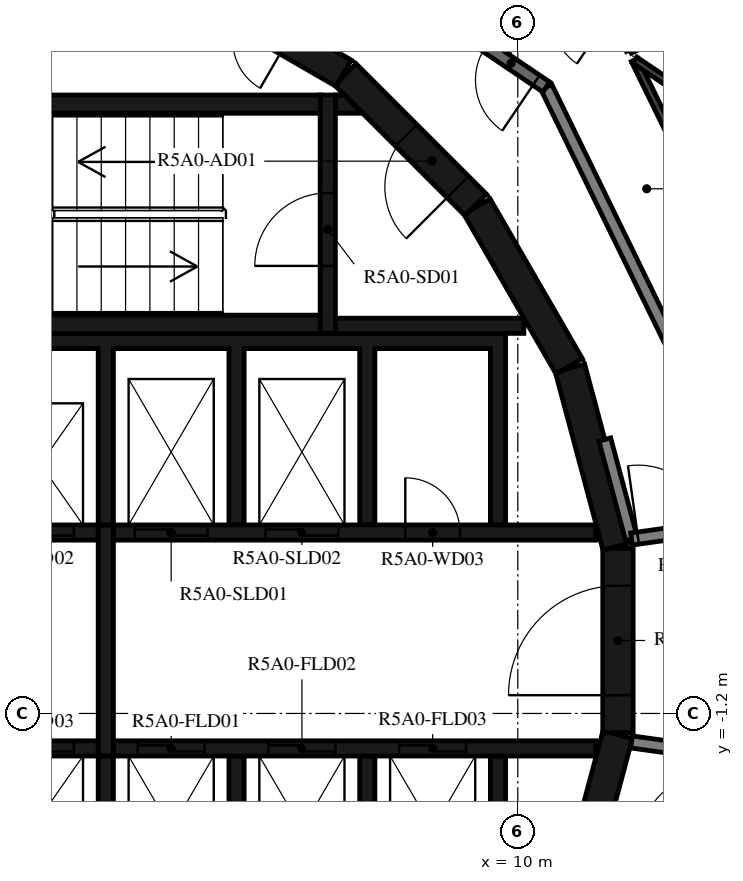
"""IFC4 building model, lengths in metres.
Left out: names, types, materials, properties, quantities, classifications, styles, units other than length and angle.
Written with IfcOpenShell. Run it as: python <this file> out.ifc"""

import sys

from ifc_helpers import new_model, si_unit, direction, frame, frame_2d, origin, place, context, subcontext, project, spatial, polyline, rectangle, outline, extrude, element, fill, save


model = new_model("IFC4")
c1 = context("Model", 3, precision=1e-05, world=origin(), true_north=direction((0.0, 1.0)))
c2 = subcontext(c1, "Body", "Model", "MODEL_VIEW")
j1 = project(units=[si_unit("LENGTHUNIT", "METRE"), si_unit("PLANEANGLEUNIT", "RADIAN")], contexts=[c1])
p1 = place(None, origin())
s1 = spatial("IfcSite", under=j1, at=p1, CompositionType="ELEMENT")
p2 = place(p1, origin())
s2 = spatial("IfcBuilding", under=s1, at=p2, CompositionType="ELEMENT")
p3 = place(p2, frame((0.0, 0.0, 195.4)))
s3 = spatial("IfcBuildingStorey", under=s2, at=p3, CompositionType="ELEMENT", Elevation=195.4)
p4 = place(p3, frame((10.858, -4.479, 0.0), z_axis=(0.0, 0.0, 1.0), x_axis=(0.258734743916, 0.965948410781, 0.0)))
e1 = element("IfcWall", 1, at=p4, inside=s3, PredefinedType="SHEAR", context=c2, shape_type="SweptSolid", body=[
    extrude(rectangle(XDim=3.033, YDim=0.5, at=frame_2d((1.516, 0.0))), origin(), (0.0, 0.0, 1.0), 3.12),
])
p5 = place(p3, frame((11.647, -1.516, 0.0), z_axis=(0.0, 0.0, 1.0), x_axis=(0.0, 1.0, 0.0)))
e2 = element("IfcWall", 2, at=p5, inside=s3, PredefinedType="SHEAR", context=c2, shape_type="SweptSolid", body=[
    extrude(rectangle(XDim=3.033, YDim=0.5, at=frame_2d((1.516, 0.0))), origin(), (0.0, 0.0, 1.0), 3.12),
])
p6 = place(p5, frame((0.616, 0.0, 0.0)))
e3 = element("IfcOpeningElement", 3, at=p6, cuts=e2, PredefinedType="OPENING", context=c2, shape_type="SweptSolid", body=[
    extrude(rectangle(XDim=1.8, YDim=2.1, at=frame_2d((0.9, 1.05))), frame((0.0, 0.26, 0.0), z_axis=(0.0, -1.0, 0.0), x_axis=(1.0, 0.0, 0.0)), (0.0, 0.0, 1.0), 0.52),
])
for number, where, z_axis, x_axis in (
    (4, (11.643, 1.55, 0.0), (0.0, 0.0, 1.0), (-0.259, 0.966, 0.0)),
    (5, (10.845, 4.51, 0.0), (0.0, 0.0, 1.0), (-0.5, 0.866, 0.0)),
):
    element("IfcWall", number, at=place(p3, frame(where, z_axis=z_axis, x_axis=x_axis)), inside=s3, PredefinedType="SHEAR", context=c2, shape_type="SweptSolid", body=[
        extrude(rectangle(XDim=3.033, YDim=0.5, at=frame_2d((1.516, 0.0))), origin(), (0.0, 0.0, 1.0), 3.12),
    ])
p7 = place(p3, frame((9.308, 7.164, 0.0), z_axis=(0.0, 0.0, 1.0), x_axis=(-0.707106781187, 0.707106781187, 0.0)))
e6 = element("IfcWall", 6, at=p7, inside=s3, PredefinedType="SHEAR", context=c2, shape_type="SweptSolid", body=[
    extrude(rectangle(XDim=3.032, YDim=0.5, at=frame_2d((1.516, 0.0))), origin(), (0.0, 0.0, 1.0), 3.12),
])
p8 = place(p7, frame((0.416, 0.0, 0.0)))
e7 = element("IfcOpeningElement", 7, at=p8, cuts=e6, PredefinedType="OPENING", context=c2, shape_type="SweptSolid", body=[
    extrude(rectangle(XDim=1.2, YDim=2.1, at=frame_2d((0.6, 1.05))), frame((0.0, 0.26, 0.0), z_axis=(0.0, -1.0, 0.0), x_axis=(1.0, 0.0, 0.0)), (0.0, 0.0, 1.0), 0.52),
])
p9 = place(p3, frame((7.137, 9.329, 0.0), z_axis=(0.0, 0.0, 1.0), x_axis=(-0.865975092491, 0.500087131594, 0.0)))
e8 = element("IfcWall", 8, at=p9, inside=s3, PredefinedType="SHEAR", context=c2, shape_type="SweptSolid", body=[
    extrude(rectangle(XDim=3.033, YDim=0.5, at=frame_2d((1.516, 0.0))), origin(), (0.0, 0.0, 1.0), 3.12),
])
p10 = place(p9, frame((1.066, 0.0, 0.0)))
e9 = element("IfcOpeningElement", 9, at=p10, cuts=e8, PredefinedType="OPENING", context=c2, shape_type="SweptSolid", body=[
    extrude(rectangle(XDim=0.9, YDim=2.1, at=frame_2d((0.45, 1.05))), frame((0.0, 0.26, 0.0), z_axis=(0.0, -1.0, 0.0), x_axis=(1.0, 0.0, 0.0)), (0.0, 0.0, 1.0), 0.52),
])
for number, where, z_axis, x_axis in (
    (10, (0.0, 5.2, 0.0), (0.0, 0.0, 1.0), (1.0, 0.0, 0.0)),
    (11, (0.0, 8.82, 0.0), (0.0, 0.0, 1.0), (1.0, 0.0, 0.0)),
):
    element("IfcWall", number, at=place(p3, frame(where, z_axis=z_axis, x_axis=x_axis)), inside=s3, PredefinedType="SHEAR", context=c2, shape_type="SweptSolid", body=[
        extrude(rectangle(XDim=6.75, YDim=0.3, at=frame_2d((3.375, 0.0))), origin(), (0.0, 0.0, 1.0), 3.12),
    ])
p11 = place(p3, frame((6.875, 5.05, 0.0), z_axis=(0.0, 0.0, 1.0), x_axis=(0.0, 1.0, 0.0)))
e12 = element("IfcWall", 12, at=p11, inside=s3, PredefinedType="SHEAR", context=c2, shape_type="SweptSolid", body=[
    extrude(rectangle(XDim=3.92, YDim=0.25, at=frame_2d((1.96, 0.0))), origin(), (0.0, 0.0, 1.0), 3.12),
])
p12 = place(p11, frame((1.11, 0.0, 0.0)))
e13 = element("IfcOpeningElement", 13, at=p12, cuts=e12, PredefinedType="OPENING", context=c2, shape_type="SweptSolid", body=[
    extrude(rectangle(XDim=1.2, YDim=2.1, at=frame_2d((0.6, 1.05))), frame((0.0, 0.135, 0.0), z_axis=(0.0, -1.0, 0.0), x_axis=(1.0, 0.0, 0.0)), (0.0, 0.0, 1.0), 0.27),
])
p13 = place(p3, frame((7.0, 5.175, 0.0), z_axis=(0.0, 0.0, 1.0), x_axis=(1.0, 0.0, 0.0)))
e14 = element("IfcWall", 14, at=p13, inside=s3, PredefinedType="SHEAR", context=c2, shape_type="SweptSolid", body=[
    extrude(rectangle(XDim=3.1, YDim=0.25, at=frame_2d((1.55, 0.0))), origin(), (0.0, 0.0, 1.0), 3.12),
])
p14 = place(p3, origin())
e15 = element("IfcWall", 15, at=p14, inside=s3, PredefinedType="SHEAR", context=c2, shape_type="SweptSolid", body=[
    extrude(outline(polyline([(7.448, 8.67), (7.0, 8.67), (7.0, 8.97), (7.148, 8.97), (7.448, 8.67)])), origin(), (0.0, 0.0, 1.0), 3.12),
])
p15 = place(p3, origin())
e16 = element("IfcWall", 16, at=p15, inside=s3, PredefinedType="SHEAR", context=c2, shape_type="SweptSolid", body=[
    extrude(outline(polyline([(-9.55, 4.8), (-5.5, 4.8), (-5.5, 1.9), (-5.25, 1.9), (-5.25, 4.8), (-1.2, 4.8), (-1.2, 1.9), (-0.95, 1.9), (-0.95, 4.8), (0.95, 4.8), (0.95, 1.9), (1.2, 1.9), (1.2, 4.8), (3.1, 4.8), (3.1, 1.9), (3.35, 1.9), (3.35, 4.8), (5.25, 4.8), (5.25, 1.9), (5.5, 1.9), (5.5, 4.8), (7.4, 4.8), (7.4, 1.9), (7.65, 1.9), (7.65, 4.8), (9.55, 4.8), (9.55, 1.9), (9.8, 1.9), (9.8, 4.8), (9.8, 5.05), (-9.8, 5.05), (-9.8, 4.8), (-9.8, 1.9), (-9.55, 1.9), (-9.55, 4.8)])), origin(), (0.0, 0.0, 1.0), 3.12),
])
p16 = place(p3, origin())
e17 = element("IfcWall", 17, at=p16, inside=s3, PredefinedType="SHEAR", context=c2, shape_type="SweptSolid", body=[
    extrude(outline(polyline([(9.8, -5.05), (9.8, -4.8), (9.8, -1.9), (9.55, -1.9), (9.55, -4.8), (7.65, -4.8), (7.65, -1.9), (7.4, -1.9), (7.4, -4.8), (5.5, -4.8), (5.5, -1.9), (5.25, -1.9), (5.25, -4.8), (3.35, -4.8), (3.35, -1.9), (3.1, -1.9), (3.1, -4.8), (1.2, -4.8), (1.2, -1.9), (0.95, -1.9), (0.95, -4.8), (-0.95, -4.8), (-0.95, -1.9), (-1.2, -1.9), (-1.2, -4.8), (-3.1, -4.8), (-3.1, -1.9), (-3.35, -1.9), (-3.35, -4.8), (-5.25, -4.8), (-5.25, -1.9), (-5.5, -1.9), (-5.5, -4.8), (-7.4, -4.8), (-7.4, -1.9), (-7.65, -1.9), (-7.65, -4.8), (-9.55, -4.8), (-9.55, -1.9), (-9.8, -1.9), (-9.8, -4.8), (-9.8, -5.05), (9.8, -5.05)])), origin(), (0.0, 0.0, 1.0), 3.12),
])
p17 = place(p3, frame((-11.28, 1.775, 0.0), z_axis=(0.0, 0.0, 1.0), x_axis=(1.0, 0.0, 0.0)))
e18 = element("IfcWall", 18, at=p17, inside=s3, PredefinedType="SHEAR", context=c2, shape_type="SweptSolid", body=[
    extrude(rectangle(XDim=14.38, YDim=0.25, at=frame_2d((7.19, 0.0))), origin(), (0.0, 0.0, 1.0), 3.12),
])
p18 = place(p17, frame((10.73, 0.0, 0.0)))
e19 = element("IfcOpeningElement", 19, at=p18, cuts=e18, PredefinedType="OPENING", context=c2, shape_type="SweptSolid", body=[
    extrude(rectangle(XDim=1.1, YDim=2.1, at=frame_2d((0.55, 1.05))), frame((0.0, 0.135, 0.0), z_axis=(0.0, -1.0, 0.0), x_axis=(1.0, 0.0, 0.0)), (0.0, 0.0, 1.0), 0.27),
])
p19 = place(p17, frame((12.88, 0.0, 0.0)))
e20 = element("IfcOpeningElement", 20, at=p19, cuts=e18, PredefinedType="OPENING", context=c2, shape_type="SweptSolid", body=[
    extrude(rectangle(XDim=1.1, YDim=2.1, at=frame_2d((0.55, 1.05))), frame((0.0, 0.135, 0.0), z_axis=(0.0, -1.0, 0.0), x_axis=(1.0, 0.0, 0.0)), (0.0, 0.0, 1.0), 0.27),
])
p20 = place(p17, frame((3.305, 0.0, 0.0)))
e21 = element("IfcOpeningElement", 21, at=p20, cuts=e18, PredefinedType="OPENING", context=c2, shape_type="SweptSolid", body=[
    extrude(rectangle(XDim=0.9, YDim=2.1, at=frame_2d((0.45, 1.05))), frame((0.0, 0.135, 0.0), z_axis=(0.0, -1.0, 0.0), x_axis=(1.0, 0.0, 0.0)), (0.0, 0.0, 1.0), 0.27),
])
p21 = place(p17, frame((7.605, 0.0, 0.0)))
e22 = element("IfcOpeningElement", 22, at=p21, cuts=e18, PredefinedType="OPENING", context=c2, shape_type="SweptSolid", body=[
    extrude(rectangle(XDim=0.9, YDim=2.1, at=frame_2d((0.45, 1.05))), frame((0.0, 0.135, 0.0), z_axis=(0.0, -1.0, 0.0), x_axis=(1.0, 0.0, 0.0)), (0.0, 0.0, 1.0), 0.27),
])
p22 = place(p3, frame((3.35, 1.775, 0.0), z_axis=(0.0, 0.0, 1.0), x_axis=(1.0, 0.0, 0.0)))
e23 = element("IfcWall", 23, at=p22, inside=s3, PredefinedType="SHEAR", context=c2, shape_type="SweptSolid", body=[
    extrude(rectangle(XDim=7.93, YDim=0.25, at=frame_2d((3.965, 0.0))), origin(), (0.0, 0.0, 1.0), 3.12),
])
p23 = place(p22, frame((0.35, 0.0, 0.0)))
e24 = element("IfcOpeningElement", 24, at=p23, cuts=e23, PredefinedType="OPENING", context=c2, shape_type="SweptSolid", body=[
    extrude(rectangle(XDim=1.2, YDim=2.4, at=frame_2d((0.6, 1.2))), frame((0.0, 0.135, 0.0), z_axis=(0.0, -1.0, 0.0), x_axis=(1.0, 0.0, 0.0)), (0.0, 0.0, 1.0), 0.27),
])
p24 = place(p22, frame((2.5, 0.0, 0.0)))
e25 = element("IfcOpeningElement", 25, at=p24, cuts=e23, PredefinedType="OPENING", context=c2, shape_type="SweptSolid", body=[
    extrude(rectangle(XDim=1.2, YDim=2.4, at=frame_2d((0.6, 1.2))), frame((0.0, 0.135, 0.0), z_axis=(0.0, -1.0, 0.0), x_axis=(1.0, 0.0, 0.0)), (0.0, 0.0, 1.0), 0.27),
])
p25 = place(p22, frame((4.8, 0.0, 0.0)))
e26 = element("IfcOpeningElement", 26, at=p25, cuts=e23, PredefinedType="OPENING", context=c2, shape_type="SweptSolid", body=[
    extrude(rectangle(XDim=0.9, YDim=2.1, at=frame_2d((0.45, 1.05))), frame((0.0, 0.135, 0.0), z_axis=(0.0, -1.0, 0.0), x_axis=(1.0, 0.0, 0.0)), (0.0, 0.0, 1.0), 0.27),
])
p26 = place(p3, frame((-11.28, -1.775, 0.0), z_axis=(0.0, 0.0, 1.0), x_axis=(1.0, 0.0, 0.0)))
e27 = element("IfcWall", 27, at=p26, inside=s3, PredefinedType="SHEAR", context=c2, shape_type="SweptSolid", body=[
    extrude(rectangle(XDim=14.38, YDim=0.25, at=frame_2d((7.19, 0.0))), origin(), (0.0, 0.0, 1.0), 3.12),
])
p27 = place(p26, frame((12.88, 0.0, 0.0)))
e28 = element("IfcOpeningElement", 28, at=p27, cuts=e27, PredefinedType="OPENING", context=c2, shape_type="SweptSolid", body=[
    extrude(rectangle(XDim=1.1, YDim=2.1, at=frame_2d((0.55, 1.05))), frame((0.0, 0.135, 0.0), z_axis=(0.0, -1.0, 0.0), x_axis=(1.0, 0.0, 0.0)), (0.0, 0.0, 1.0), 0.27),
])
p28 = place(p26, frame((6.53, 0.0, 0.0)))
e29 = element("IfcOpeningElement", 29, at=p28, cuts=e27, PredefinedType="OPENING", context=c2, shape_type="SweptSolid", body=[
    extrude(rectangle(XDim=0.9, YDim=2.1, at=frame_2d((0.45, 1.05))), frame((0.0, 0.135, 0.0), z_axis=(0.0, -1.0, 0.0), x_axis=(1.0, 0.0, 0.0)), (0.0, 0.0, 1.0), 0.27),
])
p29 = place(p26, frame((8.68, 0.0, 0.0)))
e30 = element("IfcOpeningElement", 30, at=p29, cuts=e27, PredefinedType="OPENING", context=c2, shape_type="SweptSolid", body=[
    extrude(rectangle(XDim=0.9, YDim=2.1, at=frame_2d((0.45, 1.05))), frame((0.0, 0.135, 0.0), z_axis=(0.0, -1.0, 0.0), x_axis=(1.0, 0.0, 0.0)), (0.0, 0.0, 1.0), 0.27),
])
p30 = place(p26, frame((10.83, 0.0, 0.0)))
e31 = element("IfcOpeningElement", 31, at=p30, cuts=e27, PredefinedType="OPENING", context=c2, shape_type="SweptSolid", body=[
    extrude(rectangle(XDim=0.9, YDim=2.1, at=frame_2d((0.45, 1.05))), frame((0.0, 0.135, 0.0), z_axis=(0.0, -1.0, 0.0), x_axis=(1.0, 0.0, 0.0)), (0.0, 0.0, 1.0), 0.27),
])
p31 = place(p3, frame((3.35, -1.775, 0.0), z_axis=(0.0, 0.0, 1.0), x_axis=(1.0, 0.0, 0.0)))
e32 = element("IfcWall", 32, at=p31, inside=s3, PredefinedType="SHEAR", context=c2, shape_type="SweptSolid", body=[
    extrude(rectangle(XDim=7.93, YDim=0.25, at=frame_2d((3.965, 0.0))), origin(), (0.0, 0.0, 1.0), 3.12),
])
p32 = place(p31, frame((0.4, 0.0, 0.0)))
e33 = element("IfcOpeningElement", 33, at=p32, cuts=e32, PredefinedType="OPENING", context=c2, shape_type="SweptSolid", body=[
    extrude(rectangle(XDim=1.1, YDim=2.4, at=frame_2d((0.55, 1.2))), frame((0.0, 0.135, 0.0), z_axis=(0.0, -1.0, 0.0), x_axis=(1.0, 0.0, 0.0)), (0.0, 0.0, 1.0), 0.27),
])
p33 = place(p31, frame((2.55, 0.0, 0.0)))
e34 = element("IfcOpeningElement", 34, at=p33, cuts=e32, PredefinedType="OPENING", context=c2, shape_type="SweptSolid", body=[
    extrude(rectangle(XDim=1.1, YDim=2.4, at=frame_2d((0.55, 1.2))), frame((0.0, 0.135, 0.0), z_axis=(0.0, -1.0, 0.0), x_axis=(1.0, 0.0, 0.0)), (0.0, 0.0, 1.0), 0.27),
])
p34 = place(p31, frame((4.7, 0.0, 0.0)))
e35 = element("IfcOpeningElement", 35, at=p34, cuts=e32, PredefinedType="OPENING", context=c2, shape_type="SweptSolid", body=[
    extrude(rectangle(XDim=1.1, YDim=2.4, at=frame_2d((0.55, 1.2))), frame((0.0, 0.135, 0.0), z_axis=(0.0, -1.0, 0.0), x_axis=(1.0, 0.0, 0.0)), (0.0, 0.0, 1.0), 0.27),
])
p35 = place(p3, frame((3.225, -1.9, 0.0), z_axis=(0.0, 0.0, 1.0), x_axis=(0.0, 1.0, 0.0)))
e36 = element("IfcWall", 36, at=p35, inside=s3, PredefinedType="SHEAR", context=c2, shape_type="SweptSolid", body=[
    extrude(rectangle(XDim=3.8, YDim=0.25, at=frame_2d((1.9, 0.0))), origin(), (0.0, 0.0, 1.0), 3.12),
])
p36 = place(p3, frame((11.87, 1.668, 0.0), z_axis=(0.0, 0.0, 1.0), x_axis=(-0.258836880648, 0.965921047093, 0.0)))
e37 = element("IfcWall", 37, at=p36, inside=s3, PredefinedType="STANDARD", context=c2, shape_type="SweptSolid", body=[
    extrude(rectangle(XDim=1.695, YDim=0.2, at=frame_2d((0.848, 0.0))), origin(), (0.0, 0.0, 1.0), 3.12),
])
p37 = place(p3, frame((11.87, 1.668, 0.0), z_axis=(0.0, 0.0, 1.0), x_axis=(0.990271931984, 0.139145609792, 0.0)))
e38 = element("IfcWall", 38, at=p37, inside=s3, PredefinedType="STANDARD", context=c2, shape_type="SweptSolid", body=[
    extrude(rectangle(XDim=1.712, YDim=0.2, at=frame_2d((0.856, 0.0))), origin(), (0.0, 0.0, 1.0), 3.12),
])
p38 = place(p37, frame((0.11, 0.0, 0.0)))
e39 = element("IfcOpeningElement", 39, at=p38, cuts=e38, PredefinedType="OPENING", context=c2, shape_type="SweptSolid", body=[
    extrude(rectangle(XDim=1.2, YDim=2.1, at=frame_2d((0.6, 1.05))), frame((0.0, 0.11, 0.0), z_axis=(0.0, -1.0, 0.0), x_axis=(1.0, 0.0, 0.0)), (0.0, 0.0, 1.0), 0.22),
])
p39 = place(p3, frame((13.618, 2.647, 0.0), z_axis=(0.0, 0.0, 1.0), x_axis=(-0.438366026218, 0.898796543751, 0.0)))
e40 = element("IfcWall", 40, at=p39, inside=s3, PredefinedType="STANDARD", context=c2, shape_type="SweptSolid", body=[
    extrude(rectangle(XDim=7.181, YDim=0.2, at=frame_2d((3.591, 0.0))), origin(), (0.0, 0.0, 1.0), 3.12),
])
p40 = place(p3, frame((10.47, 9.101, 0.0), z_axis=(0.0, 0.0, 1.0), x_axis=(-0.829035841718, 0.559195469534, 0.0)))
e41 = element("IfcWall", 41, at=p40, inside=s3, PredefinedType="STANDARD", context=c2, shape_type="SweptSolid", body=[
    extrude(rectangle(XDim=7.181, YDim=0.2, at=frame_2d((3.591, 0.0))), origin(), (0.0, 0.0, 1.0), 3.12),
])
p41 = place(p40, frame((0.2, 0.0, 0.0)))
e42 = element("IfcOpeningElement", 42, at=p41, cuts=e41, PredefinedType="OPENING", context=c2, shape_type="SweptSolid", body=[
    extrude(rectangle(XDim=1.0, YDim=2.1, at=frame_2d((0.5, 1.05))), frame((0.0, 0.11, 0.0), z_axis=(0.0, -1.0, 0.0), x_axis=(1.0, 0.0, 0.0)), (0.0, 0.0, 1.0), 0.22),
])
p42 = place(p40, frame((5.073, 0.0, 0.0)))
e43 = element("IfcOpeningElement", 43, at=p42, cuts=e41, PredefinedType="OPENING", context=c2, shape_type="SweptSolid", body=[
    extrude(rectangle(XDim=1.0, YDim=2.1, at=frame_2d((0.5, 1.05))), frame((0.0, 0.11, 0.0), z_axis=(0.0, -1.0, 0.0), x_axis=(1.0, 0.0, 0.0)), (0.0, 0.0, 1.0), 0.22),
])
p43 = place(p3, frame((13.302, -1.869, 0.0), z_axis=(0.0, 0.0, 1.0), x_axis=(-0.990274397042, 0.13912806533, 0.0)))
e44 = element("IfcWall", 44, at=p43, inside=s3, PredefinedType="STANDARD", context=c2, shape_type="SweptSolid", body=[
    extrude(rectangle(XDim=1.446, YDim=0.2, at=frame_2d((0.723, 0.0))), origin(), (0.0, 0.0, 1.0), 3.12),
])
p44 = place(p3, frame((13.953, 5.382, 0.0), z_axis=(0.0, 0.0, 1.0), x_axis=(-0.438382107355, 0.898788700391, 0.0)))
e45 = element("IfcWall", 45, at=p44, inside=s3, PredefinedType="PARTITIONING", context=c2, shape_type="SweptSolid", body=[
    extrude(rectangle(XDim=4.634, YDim=0.12, at=frame_2d((2.317, 0.0))), origin(), (0.0, 0.0, 1.0), 3.12),
])
p45 = place(p3, frame((22.598, 2.345, 0.0), z_axis=(0.0, 0.0, 1.0), x_axis=(-0.829034113947, 0.559198031034, 0.0)))
e46 = element("IfcWall", 46, at=p45, inside=s3, PredefinedType="PARTITIONING", context=c2, shape_type="SweptSolid", body=[
    extrude(rectangle(XDim=12.879, YDim=0.12, at=frame_2d((6.439, 0.0))), origin(), (0.0, 0.0, 1.0), 3.12),
])
p46 = place(p45, frame((0.2, 0.0, 0.0)))
e47 = element("IfcOpeningElement", 47, at=p46, cuts=e46, PredefinedType="OPENING", context=c2, shape_type="SweptSolid", body=[
    extrude(rectangle(XDim=0.9, YDim=2.1, at=frame_2d((0.45, 1.05))), frame((0.0, 0.07, 0.0), z_axis=(0.0, -1.0, 0.0), x_axis=(1.0, 0.0, 0.0)), (0.0, 0.0, 1.0), 0.14),
])
p47 = place(p3, frame((15.482, 11.487, 0.0), z_axis=(0.0, 0.0, 1.0), x_axis=(-0.898807251285, -0.438344071521, 0.0)))
e48 = element("IfcWall", 48, at=p47, inside=s3, PredefinedType="PARTITIONING", context=c2, shape_type="SweptSolid", body=[
    extrude(rectangle(XDim=4.051, YDim=0.12, at=frame_2d((2.025, 0.0))), origin(), (0.0, 0.0, 1.0), 3.12),
])
p48 = place(p12, origin())
e49 = element("IfcDoor", 49, at=p48, inside=s3, OperationType="SINGLE_SWING_LEFT", PredefinedType="DOOR", context=c2, shape_type="SweptSolid", body=[
    extrude(rectangle(XDim=1.2, YDim=2.1, at=frame_2d((0.6, 1.05))), frame((0.0, 0.025, 0.0), z_axis=(0.0, -1.0, 0.0), x_axis=(1.0, 0.0, 0.0)), (0.0, 0.0, 1.0), 0.05),
])
fill(e13, e49)
p49 = place(p8, origin())
e50 = element("IfcDoor", 50, at=p49, inside=s3, OperationType="SINGLE_SWING_RIGHT", PredefinedType="DOOR", context=c2, shape_type="SweptSolid", body=[
    extrude(rectangle(XDim=1.2, YDim=2.1, at=frame_2d((0.6, 1.05))), frame((0.0, 0.025, 0.0), z_axis=(0.0, -1.0, 0.0), x_axis=(1.0, 0.0, 0.0)), (0.0, 0.0, 1.0), 0.05),
])
fill(e7, e50)
p50 = place(p6, origin())
e51 = element("IfcDoor", 51, at=p50, inside=s3, OperationType="DOUBLE_DOOR_SINGLE_SWING", PredefinedType="DOOR", context=c2, shape_type="SweptSolid", body=[
    extrude(rectangle(XDim=1.8, YDim=2.1, at=frame_2d((0.9, 1.05))), frame((0.0, 0.025, 0.0), z_axis=(0.0, -1.0, 0.0), x_axis=(1.0, 0.0, 0.0)), (0.0, 0.0, 1.0), 0.05),
])
fill(e3, e51)
p51 = place(p19, origin())
e52 = element("IfcDoor", 52, at=p51, inside=s3, OperationType="DOUBLE_DOOR_SLIDING", PredefinedType="DOOR", context=c2, shape_type="SweptSolid", body=[
    extrude(rectangle(XDim=1.1, YDim=2.1, at=frame_2d((0.55, 1.05))), frame((0.0, 0.025, 0.0), z_axis=(0.0, -1.0, 0.0), x_axis=(1.0, 0.0, 0.0)), (0.0, 0.0, 1.0), 0.05),
])
fill(e20, e52)
p52 = place(p23, origin())
e53 = element("IfcDoor", 53, at=p52, inside=s3, OperationType="DOUBLE_DOOR_SLIDING", PredefinedType="DOOR", context=c2, shape_type="SweptSolid", body=[
    extrude(rectangle(XDim=1.2, YDim=2.4, at=frame_2d((0.6, 1.2))), frame((0.0, 0.025, 0.0), z_axis=(0.0, -1.0, 0.0), x_axis=(1.0, 0.0, 0.0)), (0.0, 0.0, 1.0), 0.05),
])
fill(e24, e53)
p53 = place(p24, origin())
e54 = element("IfcDoor", 54, at=p53, inside=s3, OperationType="DOUBLE_DOOR_SLIDING", PredefinedType="DOOR", context=c2, shape_type="SweptSolid", body=[
    extrude(rectangle(XDim=1.2, YDim=2.4, at=frame_2d((0.6, 1.2))), frame((0.0, 0.025, 0.0), z_axis=(0.0, -1.0, 0.0), x_axis=(1.0, 0.0, 0.0)), (0.0, 0.0, 1.0), 0.05),
])
fill(e25, e54)
p54 = place(p27, origin())
e55 = element("IfcDoor", 55, at=p54, inside=s3, OperationType="DOUBLE_DOOR_SLIDING", PredefinedType="DOOR", context=c2, shape_type="SweptSolid", body=[
    extrude(rectangle(XDim=1.1, YDim=2.1, at=frame_2d((0.55, 1.05))), frame((0.0, 0.025, 0.0), z_axis=(0.0, -1.0, 0.0), x_axis=(1.0, 0.0, 0.0)), (0.0, 0.0, 1.0), 0.05),
])
fill(e28, e55)
p55 = place(p32, origin())
e56 = element("IfcDoor", 56, at=p55, inside=s3, OperationType="DOUBLE_DOOR_SLIDING", PredefinedType="DOOR", context=c2, shape_type="SweptSolid", body=[
    extrude(rectangle(XDim=1.1, YDim=2.4, at=frame_2d((0.55, 1.2))), frame((0.0, 0.025, 0.0), z_axis=(0.0, -1.0, 0.0), x_axis=(1.0, 0.0, 0.0)), (0.0, 0.0, 1.0), 0.05),
])
fill(e33, e56)
p56 = place(p33, origin())
e57 = element("IfcDoor", 57, at=p56, inside=s3, OperationType="DOUBLE_DOOR_SLIDING", PredefinedType="DOOR", context=c2, shape_type="SweptSolid", body=[
    extrude(rectangle(XDim=1.1, YDim=2.4, at=frame_2d((0.55, 1.2))), frame((0.0, 0.025, 0.0), z_axis=(0.0, -1.0, 0.0), x_axis=(1.0, 0.0, 0.0)), (0.0, 0.0, 1.0), 0.05),
])
fill(e34, e57)
p57 = place(p34, origin())
e58 = element("IfcDoor", 58, at=p57, inside=s3, OperationType="DOUBLE_DOOR_SLIDING", PredefinedType="DOOR", context=c2, shape_type="SweptSolid", body=[
    extrude(rectangle(XDim=1.1, YDim=2.4, at=frame_2d((0.55, 1.2))), frame((0.0, 0.025, 0.0), z_axis=(0.0, -1.0, 0.0), x_axis=(1.0, 0.0, 0.0)), (0.0, 0.0, 1.0), 0.05),
])
fill(e35, e58)
p58 = place(p25, origin())
e59 = element("IfcDoor", 59, at=p58, inside=s3, OperationType="SINGLE_SWING_LEFT", PredefinedType="DOOR", context=c2, shape_type="SweptSolid", body=[
    extrude(rectangle(XDim=0.9, YDim=2.1, at=frame_2d((0.45, 1.05))), frame((0.0, 0.025, 0.0), z_axis=(0.0, -1.0, 0.0), x_axis=(1.0, 0.0, 0.0)), (0.0, 0.0, 1.0), 0.05),
])
fill(e26, e59)
p59 = place(p41, origin())
e60 = element("IfcDoor", 60, at=p59, inside=s3, OperationType="SINGLE_SWING_LEFT", PredefinedType="DOOR", context=c2, shape_type="SweptSolid", body=[
    extrude(rectangle(XDim=1.0, YDim=2.1, at=frame_2d((0.5, 1.05))), frame((0.0, 0.025, 0.0), z_axis=(0.0, -1.0, 0.0), x_axis=(1.0, 0.0, 0.0)), (0.0, 0.0, 1.0), 0.05),
])
fill(e42, e60)
p60 = place(p38, origin())
e61 = element("IfcDoor", 61, at=p60, inside=s3, OperationType="DOUBLE_DOOR_SINGLE_SWING", PredefinedType="DOOR", context=c2, shape_type="SweptSolid", body=[
    extrude(rectangle(XDim=1.2, YDim=2.1, at=frame_2d((0.6, 1.05))), frame((0.0, 0.025, 0.0), z_axis=(0.0, -1.0, 0.0), x_axis=(1.0, 0.0, 0.0)), (0.0, 0.0, 1.0), 0.05),
])
fill(e39, e61)
save(model, sys.argv[1])
